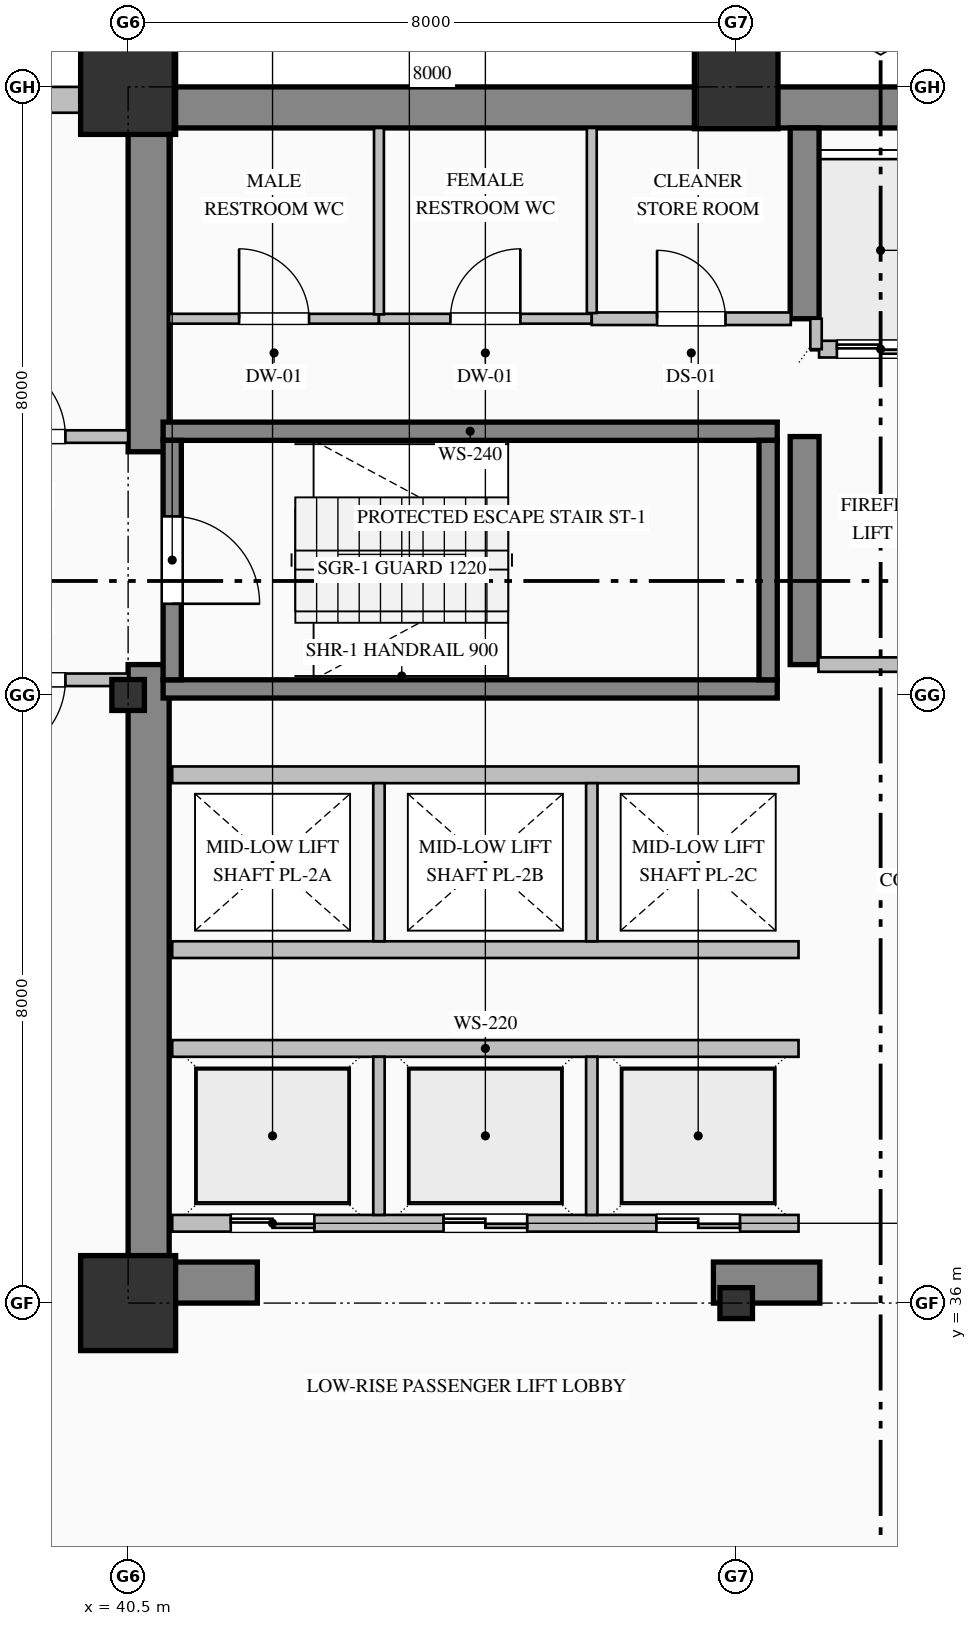
"""IFC4 building model, lengths in metres.
Left out: names, types, materials, properties, quantities, classifications, styles, units other than length and angle.
Written with IfcOpenShell. Run it as: python <this file> out.ifc"""

import sys

from ifc_helpers import new_model, si_unit, direction, frame, frame_2d, origin, origin_2d, place, context, subcontext, project, spatial, rectangle, hollow_rectangle, i_section, extrude, element, fill, save


model = new_model("IFC4")
c1 = context("Model", 3, precision=1e-05, world=origin(), true_north=direction((0.0, 1.0)))
c2 = subcontext(c1, "Body", "Model", "MODEL_VIEW")
j1 = project(units=[si_unit("LENGTHUNIT", "METRE"), si_unit("PLANEANGLEUNIT", "RADIAN")], contexts=[c1])
p1 = place(None, origin())
s1 = spatial("IfcSite", under=j1, at=p1, CompositionType="ELEMENT")
p2 = place(p1, origin())
s2 = spatial("IfcBuilding", under=s1, at=p2, CompositionType="ELEMENT")
p3 = place(p2, frame((0.0, 0.0, 56.2)))
s3 = spatial("IfcBuildingStorey", under=s2, at=p3, CompositionType="ELEMENT", Elevation=56.2)
p4 = place(p3, frame((40.5, 51.73, 0.0), z_axis=(0.0, 0.0, 1.0), x_axis=(1.0, 0.0, 0.0)))
e1 = element("IfcWall", 1, at=p4, inside=s3, PredefinedType="SHEAR", context=c2, shape_type="SweptSolid", body=[
    extrude(rectangle(XDim=23.5, YDim=0.54, at=frame_2d((11.75, 0.0))), origin(), (0.0, 0.0, 1.0), 3.75),
])
p5 = place(p3, frame((40.77, 36.54, 0.0), z_axis=(0.0, 0.0, 1.0), x_axis=(0.0, 1.0, 0.0)))
e2 = element("IfcWall", 2, at=p5, inside=s3, PredefinedType="SHEAR", context=c2, shape_type="SweptSolid", body=[
    extrude(rectangle(XDim=7.86, YDim=0.54, at=frame_2d((3.93, 0.0))), origin(), (0.0, 0.0, 1.0), 3.75),
])
p6 = place(p3, frame((40.77, 47.2, 0.0), z_axis=(0.0, 0.0, 1.0), x_axis=(0.0, 1.0, 0.0)))
e3 = element("IfcWall", 3, at=p6, inside=s3, PredefinedType="SHEAR", context=c2, shape_type="SweptSolid", body=[
    extrude(rectangle(XDim=4.26, YDim=0.54, at=frame_2d((2.13, 0.0))), origin(), (0.0, 0.0, 1.0), 3.75),
])
p7 = place(p3, frame((40.5, 36.27, 0.0), z_axis=(0.0, 0.0, 1.0), x_axis=(1.0, 0.0, 0.0)))
e4 = element("IfcWall", 4, at=p7, inside=s3, PredefinedType="SHEAR", context=c2, shape_type="SweptSolid", body=[
    extrude(rectangle(XDim=1.7, YDim=0.54, at=frame_2d((0.85, 0.0))), origin(), (0.0, 0.0, 1.0), 3.75),
])
p8 = place(p3, frame((48.2, 36.27, 0.0), z_axis=(0.0, 0.0, 1.0), x_axis=(1.0, 0.0, 0.0)))
e5 = element("IfcWall", 5, at=p8, inside=s3, PredefinedType="SHEAR", context=c2, shape_type="SweptSolid", body=[
    extrude(rectangle(XDim=1.4, YDim=0.54, at=frame_2d((0.7, 0.0))), origin(), (0.0, 0.0, 1.0), 3.75),
])
p9 = place(p3, frame((49.4, 44.4, 0.0), z_axis=(0.0, 0.0, 1.0), x_axis=(0.0, 1.0, 0.0)))
e6 = element("IfcWall", 6, at=p9, inside=s3, PredefinedType="SHEAR", context=c2, shape_type="SweptSolid", body=[
    extrude(rectangle(XDim=3.0, YDim=0.38, at=frame_2d((1.5, 0.0))), origin(), (0.0, 0.0, 1.0), 3.75),
])
p10 = place(p3, frame((49.4, 48.95, 0.0), z_axis=(0.0, 0.0, 1.0), x_axis=(0.0, 1.0, 0.0)))
e7 = element("IfcWall", 7, at=p10, inside=s3, PredefinedType="SHEAR", context=c2, shape_type="SweptSolid", body=[
    extrude(rectangle(XDim=2.51, YDim=0.38, at=frame_2d((1.255, 0.0))), origin(), (0.0, 0.0, 1.0), 3.75),
])
p11 = place(p3, frame((40.5, 36.0, 0.0), z_axis=(0.0, 0.0, 1.0), x_axis=(1.0, 0.0, 0.0)))
e8 = element("IfcColumn", 8, at=p11, inside=s3, PredefinedType="COLUMN", context=c2, shape_type="SweptSolid", body=[
    extrude(hollow_rectangle(XDim=1.25, YDim=1.25, WallThickness=0.045, at=origin_2d()), origin(), (0.0, 0.0, 1.0), 4.0),
])
p12 = place(p3, frame((40.5, 44.0, 0.0), z_axis=(0.0, 0.0, 1.0), x_axis=(1.0, 0.0, 0.0)))
e9 = element("IfcColumn", 9, at=p12, inside=s3, PredefinedType="COLUMN", context=c2, shape_type="SweptSolid", body=[
    extrude(i_section(OverallWidth=0.407, OverallDepth=0.428, WebThickness=0.02, FlangeThickness=0.035, FilletRadius=0.022, at=origin_2d()), origin(), (0.0, 0.0, 1.0), 4.0),
])
p13 = place(p3, frame((40.5, 52.0, 0.0), z_axis=(0.0, 0.0, 1.0), x_axis=(1.0, 0.0, 0.0)))
e10 = element("IfcColumn", 10, at=p13, inside=s3, PredefinedType="COLUMN", context=c2, shape_type="SweptSolid", body=[
    extrude(hollow_rectangle(XDim=1.25, YDim=1.25, WallThickness=0.045, at=origin_2d()), origin(), (0.0, 0.0, 1.0), 4.0),
])
p14 = place(p3, frame((48.5, 36.0, 0.0), z_axis=(0.0, 0.0, 1.0), x_axis=(1.0, 0.0, 0.0)))
e11 = element("IfcColumn", 11, at=p14, inside=s3, PredefinedType="COLUMN", context=c2, shape_type="SweptSolid", body=[
    extrude(i_section(OverallWidth=0.407, OverallDepth=0.428, WebThickness=0.02, FlangeThickness=0.035, FilletRadius=0.022, at=origin_2d()), origin(), (0.0, 0.0, 1.0), 4.0),
])
p15 = place(p3, frame((48.5, 52.0, 0.0), z_axis=(0.0, 0.0, 1.0), x_axis=(1.0, 0.0, 0.0)))
e12 = element("IfcColumn", 12, at=p15, inside=s3, PredefinedType="COLUMN", context=c2, shape_type="SweptSolid", body=[
    extrude(hollow_rectangle(XDim=1.1, YDim=1.1, WallThickness=0.04, at=origin_2d()), origin(), (0.0, 0.0, 1.0), 4.0),
])
p16 = place(p3, frame((4.0, 51.83, 0.0), z_axis=(0.0, 0.0, 1.0), x_axis=(1.0, 0.0, 0.0)))
e13 = element("IfcWall", 13, at=p16, inside=s3, PredefinedType="SOLIDWALL", context=c2, shape_type="SweptSolid", body=[
    extrude(rectangle(XDim=36.52, YDim=0.34, at=frame_2d((18.26, 0.0))), origin(), (0.0, 0.0, 1.0), 3.25),
])
p17 = place(p16, frame((6.15, 0.0, 0.85)))
e14 = element("IfcOpeningElement", 14, at=p17, cuts=e13, PredefinedType="OPENING", context=c2, shape_type="SweptSolid", body=[
    extrude(rectangle(XDim=2.1, YDim=2.05, at=frame_2d((1.05, 1.025))), frame((0.0, 0.18, 0.0), z_axis=(0.0, -1.0, 0.0), x_axis=(1.0, 0.0, 0.0)), (0.0, 0.0, 1.0), 0.36),
])
p18 = place(p16, frame((13.5, 0.0, 0.85)))
e15 = element("IfcOpeningElement", 15, at=p18, cuts=e13, PredefinedType="OPENING", context=c2, shape_type="SweptSolid", body=[
    extrude(rectangle(XDim=1.8, YDim=2.05, at=frame_2d((0.9, 1.025))), frame((0.0, 0.18, 0.0), z_axis=(0.0, -1.0, 0.0), x_axis=(1.0, 0.0, 0.0)), (0.0, 0.0, 1.0), 0.36),
])
p19 = place(p16, frame((16.95, 0.0, 0.85)))
e16 = element("IfcOpeningElement", 16, at=p19, cuts=e13, PredefinedType="OPENING", context=c2, shape_type="SweptSolid", body=[
    extrude(rectangle(XDim=2.1, YDim=2.05, at=frame_2d((1.05, 1.025))), frame((0.0, 0.18, 0.0), z_axis=(0.0, -1.0, 0.0), x_axis=(1.0, 0.0, 0.0)), (0.0, 0.0, 1.0), 0.36),
])
p20 = place(p16, frame((24.3, 0.0, 0.85)))
e17 = element("IfcOpeningElement", 17, at=p20, cuts=e13, PredefinedType="OPENING", context=c2, shape_type="SweptSolid", body=[
    extrude(rectangle(XDim=1.8, YDim=2.05, at=frame_2d((0.9, 1.025))), frame((0.0, 0.18, 0.0), z_axis=(0.0, -1.0, 0.0), x_axis=(1.0, 0.0, 0.0)), (0.0, 0.0, 1.0), 0.36),
])
for number, where, z_axis, x_axis in (
    (18, (40.96, 47.47, 0.0), (0.0, 0.0, 1.0), (1.0, 0.0, 0.0)),
    (19, (49.04, 44.08, 0.0), (0.0, 0.0, 1.0), (-1.0, 0.0, 0.0)),
):
    element("IfcWall", number, at=place(p3, frame(where, z_axis=z_axis, x_axis=x_axis)), inside=s3, PredefinedType="SOLIDWALL", context=c2, shape_type="SweptSolid", body=[
        extrude(rectangle(XDim=8.08, YDim=0.24, at=frame_2d((4.04, 0.0))), origin(), (0.0, 0.0, 1.0), 4.0),
    ])
p21 = place(p3, frame((41.08, 47.35, 0.0), z_axis=(0.0, 0.0, 1.0), x_axis=(0.0, -1.0, 0.0)))
e20 = element("IfcWall", 20, at=p21, inside=s3, PredefinedType="SOLIDWALL", context=c2, shape_type="SweptSolid", body=[
    extrude(rectangle(XDim=3.15, YDim=0.24, at=frame_2d((1.575, 0.0))), origin(), (0.0, 0.0, 1.0), 4.0),
])
p22 = place(p21, frame((1.0, 0.0, 0.0)))
e21 = element("IfcOpeningElement", 21, at=p22, cuts=e20, PredefinedType="OPENING", context=c2, shape_type="SweptSolid", body=[
    extrude(rectangle(XDim=1.15, YDim=2.2, at=frame_2d((0.575, 1.1))), frame((0.0, 0.13, 0.0), z_axis=(0.0, -1.0, 0.0), x_axis=(1.0, 0.0, 0.0)), (0.0, 0.0, 1.0), 0.26),
])
p23 = place(p3, frame((48.92, 44.2, 0.0), z_axis=(0.0, 0.0, 1.0), x_axis=(0.0, 1.0, 0.0)))
e22 = element("IfcWall", 22, at=p23, inside=s3, PredefinedType="SOLIDWALL", context=c2, shape_type="SweptSolid", body=[
    extrude(rectangle(XDim=3.15, YDim=0.24, at=frame_2d((1.575, 0.0))), origin(), (0.0, 0.0, 1.0), 4.0),
])
p24 = place(p3, frame((54.71, 48.55, 0.0), z_axis=(0.0, 0.0, 1.0), x_axis=(-1.0, 0.0, 0.0)))
e23 = element("IfcWall", 23, at=p24, inside=s3, PredefinedType="PARTITIONING", context=c2, shape_type="SweptSolid", body=[
    extrude(rectangle(XDim=5.12, YDim=0.22, at=frame_2d((2.56, 0.0))), origin(), (0.0, 0.0, 1.0), 3.75),
])
p25 = place(p24, frame((3.735, 0.0, 0.0)))
e24 = element("IfcOpeningElement", 24, at=p25, cuts=e23, PredefinedType="OPENING", context=c2, shape_type="SweptSolid", body=[
    extrude(rectangle(XDim=1.15, YDim=2.2, at=frame_2d((0.575, 1.1))), frame((0.0, 0.12, 0.0), z_axis=(0.0, -1.0, 0.0), x_axis=(1.0, 0.0, 0.0)), (0.0, 0.0, 1.0), 0.24),
])
p26 = place(p24, frame((0.935, 0.0, 0.0)))
e25 = element("IfcOpeningElement", 25, at=p26, cuts=e23, PredefinedType="OPENING", context=c2, shape_type="SweptSolid", body=[
    extrude(rectangle(XDim=1.15, YDim=2.2, at=frame_2d((0.575, 1.1))), frame((0.0, 0.12, 0.0), z_axis=(0.0, -1.0, 0.0), x_axis=(1.0, 0.0, 0.0)), (0.0, 0.0, 1.0), 0.24),
])
p27 = place(p3, frame((49.55, 48.55, 0.0), z_axis=(0.0, 0.0, 1.0), x_axis=(0.0, 1.0, 0.0)))
e26 = element("IfcWall", 26, at=p27, inside=s3, PredefinedType="PARTITIONING", context=c2, shape_type="SweptSolid", body=[
    extrude(rectangle(XDim=0.4, YDim=0.15, at=frame_2d((0.2, 0.0))), origin(), (0.0, 0.0, 1.0), 3.75),
])
p28 = place(p3, frame((49.32, 37.05, 0.0), z_axis=(0.0, 0.0, 1.0), x_axis=(-1.0, 0.0, 0.0)))
e27 = element("IfcWall", 27, at=p28, inside=s3, PredefinedType="PARTITIONING", context=c2, shape_type="SweptSolid", body=[
    extrude(rectangle(XDim=8.24, YDim=0.22, at=frame_2d((4.12, 0.0))), origin(), (0.0, 0.0, 1.0), 3.75),
])
p29 = place(p28, frame((6.37, 0.0, 0.0)))
e28 = element("IfcOpeningElement", 28, at=p29, cuts=e27, PredefinedType="OPENING", context=c2, shape_type="SweptSolid", body=[
    extrude(rectangle(XDim=1.1, YDim=2.2, at=frame_2d((0.55, 1.1))), frame((0.0, 0.12, 0.0), z_axis=(0.0, -1.0, 0.0), x_axis=(1.0, 0.0, 0.0)), (0.0, 0.0, 1.0), 0.24),
])
p30 = place(p28, frame((3.57, 0.0, 0.0)))
e29 = element("IfcOpeningElement", 29, at=p30, cuts=e27, PredefinedType="OPENING", context=c2, shape_type="SweptSolid", body=[
    extrude(rectangle(XDim=1.1, YDim=2.2, at=frame_2d((0.55, 1.1))), frame((0.0, 0.12, 0.0), z_axis=(0.0, -1.0, 0.0), x_axis=(1.0, 0.0, 0.0)), (0.0, 0.0, 1.0), 0.24),
])
p31 = place(p28, frame((0.77, 0.0, 0.0)))
e30 = element("IfcOpeningElement", 30, at=p31, cuts=e27, PredefinedType="OPENING", context=c2, shape_type="SweptSolid", body=[
    extrude(rectangle(XDim=1.1, YDim=2.2, at=frame_2d((0.55, 1.1))), frame((0.0, 0.12, 0.0), z_axis=(0.0, -1.0, 0.0), x_axis=(1.0, 0.0, 0.0)), (0.0, 0.0, 1.0), 0.24),
])
p32 = place(p3, frame((41.08, 39.35, 0.0), z_axis=(0.0, 0.0, 1.0), x_axis=(1.0, 0.0, 0.0)))
e31 = element("IfcWall", 31, at=p32, inside=s3, PredefinedType="PARTITIONING", context=c2, shape_type="SweptSolid", body=[
    extrude(rectangle(XDim=8.24, YDim=0.22, at=frame_2d((4.12, 0.0))), origin(), (0.0, 0.0, 1.0), 3.75),
])
for number, where, z_axis, x_axis in (
    (32, (43.8, 37.16, 0.0), (0.0, 0.0, 1.0), (0.0, 1.0, 0.0)),
    (33, (46.6, 37.16, 0.0), (0.0, 0.0, 1.0), (0.0, 1.0, 0.0)),
):
    element("IfcWall", number, at=place(p3, frame(where, z_axis=z_axis, x_axis=x_axis)), inside=s3, PredefinedType="PARTITIONING", context=c2, shape_type="SweptSolid", body=[
        extrude(rectangle(XDim=2.08, YDim=0.15, at=frame_2d((1.04, 0.0))), origin(), (0.0, 0.0, 1.0), 3.75),
    ])
for number, where, z_axis, x_axis in (
    (34, (49.32, 40.65, 0.0), (0.0, 0.0, 1.0), (-1.0, 0.0, 0.0)),
    (35, (41.08, 42.95, 0.0), (0.0, 0.0, 1.0), (1.0, 0.0, 0.0)),
):
    element("IfcWall", number, at=place(p3, frame(where, z_axis=z_axis, x_axis=x_axis)), inside=s3, PredefinedType="PARTITIONING", context=c2, shape_type="SweptSolid", body=[
        extrude(rectangle(XDim=8.24, YDim=0.22, at=frame_2d((4.12, 0.0))), origin(), (0.0, 0.0, 1.0), 3.75),
    ])
for number, where, z_axis, x_axis in (
    (36, (43.8, 40.76, 0.0), (0.0, 0.0, 1.0), (0.0, 1.0, 0.0)),
    (37, (46.6, 40.76, 0.0), (0.0, 0.0, 1.0), (0.0, 1.0, 0.0)),
):
    element("IfcWall", number, at=place(p3, frame(where, z_axis=z_axis, x_axis=x_axis)), inside=s3, PredefinedType="PARTITIONING", context=c2, shape_type="SweptSolid", body=[
        extrude(rectangle(XDim=2.08, YDim=0.15, at=frame_2d((1.04, 0.0))), origin(), (0.0, 0.0, 1.0), 3.75),
    ])
p33 = place(p3, frame((37.8, 47.4, 0.0), z_axis=(0.0, 0.0, 1.0), x_axis=(1.0, 0.0, 0.0)))
e38 = element("IfcWall", 38, at=p33, inside=s3, PredefinedType="PARTITIONING", context=c2, shape_type="SweptSolid", body=[
    extrude(rectangle(XDim=2.7, YDim=0.165, at=frame_2d((1.35, 0.0))), origin(), (0.0, 0.0, 1.0), 3.75),
])
p34 = place(p33, frame((0.825, 0.0, 0.0)))
e39 = element("IfcOpeningElement", 39, at=p34, cuts=e38, PredefinedType="OPENING", context=c2, shape_type="SweptSolid", body=[
    extrude(rectangle(XDim=1.05, YDim=2.15, at=frame_2d((0.525, 1.075))), frame((0.0, 0.093, 0.0), z_axis=(0.0, -1.0, 0.0), x_axis=(1.0, 0.0, 0.0)), (0.0, 0.0, 1.0), 0.185),
])
p35 = place(p3, frame((40.5, 44.2, 0.0), z_axis=(0.0, 0.0, 1.0), x_axis=(-1.0, 0.0, 0.0)))
e40 = element("IfcWall", 40, at=p35, inside=s3, PredefinedType="PARTITIONING", context=c2, shape_type="SweptSolid", body=[
    extrude(rectangle(XDim=2.7, YDim=0.165, at=frame_2d((1.35, 0.0))), origin(), (0.0, 0.0, 1.0), 3.75),
])
p36 = place(p35, frame((0.825, 0.0, 0.0)))
e41 = element("IfcOpeningElement", 41, at=p36, cuts=e40, PredefinedType="OPENING", context=c2, shape_type="SweptSolid", body=[
    extrude(rectangle(XDim=1.05, YDim=2.15, at=frame_2d((0.525, 1.075))), frame((0.0, 0.093, 0.0), z_axis=(0.0, -1.0, 0.0), x_axis=(1.0, 0.0, 0.0)), (0.0, 0.0, 1.0), 0.185),
])
p37 = place(p3, frame((41.04, 48.95, 0.0), z_axis=(0.0, 0.0, 1.0), x_axis=(1.0, 0.0, 0.0)))
e42 = element("IfcWall", 42, at=p37, inside=s3, PredefinedType="PARTITIONING", context=c2, shape_type="SweptSolid", body=[
    extrude(rectangle(XDim=2.76, YDim=0.13, at=frame_2d((1.38, 0.0))), origin(), (0.0, 0.0, 1.0), 3.75),
])
p38 = place(p37, frame((0.92, 0.0, 0.0)))
e43 = element("IfcOpeningElement", 43, at=p38, cuts=e42, PredefinedType="OPENING", context=c2, shape_type="SweptSolid", body=[
    extrude(rectangle(XDim=0.92, YDim=2.15, at=frame_2d((0.46, 1.075))), frame((0.0, 0.075, 0.0), z_axis=(0.0, -1.0, 0.0), x_axis=(1.0, 0.0, 0.0)), (0.0, 0.0, 1.0), 0.15),
])
p39 = place(p3, frame((43.8, 48.95, 0.0), z_axis=(0.0, 0.0, 1.0), x_axis=(1.0, 0.0, 0.0)))
e44 = element("IfcWall", 44, at=p39, inside=s3, PredefinedType="PARTITIONING", context=c2, shape_type="SweptSolid", body=[
    extrude(rectangle(XDim=2.8, YDim=0.13, at=frame_2d((1.4, 0.0))), origin(), (0.0, 0.0, 1.0), 3.75),
])
p40 = place(p39, frame((0.94, 0.0, 0.0)))
e45 = element("IfcOpeningElement", 45, at=p40, cuts=e44, PredefinedType="OPENING", context=c2, shape_type="SweptSolid", body=[
    extrude(rectangle(XDim=0.92, YDim=2.15, at=frame_2d((0.46, 1.075))), frame((0.0, 0.075, 0.0), z_axis=(0.0, -1.0, 0.0), x_axis=(1.0, 0.0, 0.0)), (0.0, 0.0, 1.0), 0.15),
])
p41 = place(p3, frame((46.6, 48.95, 0.0), z_axis=(0.0, 0.0, 1.0), x_axis=(1.0, 0.0, 0.0)))
e46 = element("IfcWall", 46, at=p41, inside=s3, PredefinedType="PARTITIONING", context=c2, shape_type="SweptSolid", body=[
    extrude(rectangle(XDim=2.618, YDim=0.165, at=frame_2d((1.309, 0.0))), origin(), (0.0, 0.0, 1.0), 3.75),
])
p42 = place(p41, frame((0.859, 0.0, 0.0)))
e47 = element("IfcOpeningElement", 47, at=p42, cuts=e46, PredefinedType="OPENING", context=c2, shape_type="SweptSolid", body=[
    extrude(rectangle(XDim=0.9, YDim=2.15, at=frame_2d((0.45, 1.075))), frame((0.0, 0.093, 0.0), z_axis=(0.0, -1.0, 0.0), x_axis=(1.0, 0.0, 0.0)), (0.0, 0.0, 1.0), 0.185),
])
p43 = place(p3, frame((54.718, 44.4, 0.0), z_axis=(0.0, 0.0, 1.0), x_axis=(-1.0, 0.0, 0.0)))
e48 = element("IfcWall", 48, at=p43, inside=s3, PredefinedType="PARTITIONING", context=c2, shape_type="SweptSolid", body=[
    extrude(rectangle(XDim=5.136, YDim=0.19, at=frame_2d((2.568, 0.0))), origin(), (0.0, 0.0, 1.0), 3.75),
])
p44 = place(p43, frame((2.043, 0.0, 0.0)))
e49 = element("IfcOpeningElement", 49, at=p44, cuts=e48, PredefinedType="OPENING", context=c2, shape_type="SweptSolid", body=[
    extrude(rectangle(XDim=1.05, YDim=2.15, at=frame_2d((0.525, 1.075))), frame((0.0, 0.105, 0.0), z_axis=(0.0, -1.0, 0.0), x_axis=(1.0, 0.0, 0.0)), (0.0, 0.0, 1.0), 0.21),
])
p45 = place(p3, frame((43.8, 51.46, 0.0), z_axis=(0.0, 0.0, 1.0), x_axis=(0.0, -1.0, 0.0)))
e50 = element("IfcWall", 50, at=p45, inside=s3, PredefinedType="PARTITIONING", context=c2, shape_type="SweptSolid", body=[
    extrude(rectangle(XDim=2.453, YDim=0.13, at=frame_2d((1.227, 0.0))), origin(), (0.0, 0.0, 1.0), 3.75),
])
p46 = place(p3, frame((46.6, 51.46, 0.0), z_axis=(0.0, 0.0, 1.0), x_axis=(0.0, -1.0, 0.0)))
e51 = element("IfcWall", 51, at=p46, inside=s3, PredefinedType="PARTITIONING", context=c2, shape_type="SweptSolid", body=[
    extrude(rectangle(XDim=2.436, YDim=0.13, at=frame_2d((1.218, 0.0))), origin(), (0.0, 0.0, 1.0), 3.75),
])
p47 = place(p22, origin())
e52 = element("IfcDoor", 52, at=p47, inside=s3, OperationType="SINGLE_SWING_RIGHT", PredefinedType="DOOR", context=c2, shape_type="SweptSolid", body=[
    extrude(rectangle(XDim=1.15, YDim=2.2, at=frame_2d((0.575, 1.1))), frame((0.0, 0.025, 0.0), z_axis=(0.0, -1.0, 0.0), x_axis=(1.0, 0.0, 0.0)), (0.0, 0.0, 1.0), 0.05),
])
fill(e21, e52)
p48 = place(p25, origin())
e53 = element("IfcDoor", 53, at=p48, inside=s3, OperationType="DOUBLE_DOOR_SLIDING", PredefinedType="DOOR", context=c2, shape_type="SweptSolid", body=[
    extrude(rectangle(XDim=1.15, YDim=2.2, at=frame_2d((0.575, 1.1))), frame((0.0, 0.025, 0.0), z_axis=(0.0, -1.0, 0.0), x_axis=(1.0, 0.0, 0.0)), (0.0, 0.0, 1.0), 0.05),
])
fill(e24, e53)
p49 = place(p29, origin())
e54 = element("IfcDoor", 54, at=p49, inside=s3, OperationType="DOUBLE_DOOR_SLIDING", PredefinedType="DOOR", context=c2, shape_type="SweptSolid", body=[
    extrude(rectangle(XDim=1.1, YDim=2.2, at=frame_2d((0.55, 1.1))), frame((0.0, 0.025, 0.0), z_axis=(0.0, -1.0, 0.0), x_axis=(1.0, 0.0, 0.0)), (0.0, 0.0, 1.0), 0.05),
])
fill(e28, e54)
p50 = place(p30, origin())
e55 = element("IfcDoor", 55, at=p50, inside=s3, OperationType="DOUBLE_DOOR_SLIDING", PredefinedType="DOOR", context=c2, shape_type="SweptSolid", body=[
    extrude(rectangle(XDim=1.1, YDim=2.2, at=frame_2d((0.55, 1.1))), frame((0.0, 0.025, 0.0), z_axis=(0.0, -1.0, 0.0), x_axis=(1.0, 0.0, 0.0)), (0.0, 0.0, 1.0), 0.05),
])
fill(e29, e55)
p51 = place(p31, origin())
e56 = element("IfcDoor", 56, at=p51, inside=s3, OperationType="DOUBLE_DOOR_SLIDING", PredefinedType="DOOR", context=c2, shape_type="SweptSolid", body=[
    extrude(rectangle(XDim=1.1, YDim=2.2, at=frame_2d((0.55, 1.1))), frame((0.0, 0.025, 0.0), z_axis=(0.0, -1.0, 0.0), x_axis=(1.0, 0.0, 0.0)), (0.0, 0.0, 1.0), 0.05),
])
fill(e30, e56)
p52 = place(p34, origin())
e57 = element("IfcDoor", 57, at=p52, inside=s3, OperationType="SINGLE_SWING_LEFT", PredefinedType="DOOR", context=c2, shape_type="SweptSolid", body=[
    extrude(rectangle(XDim=1.05, YDim=2.15, at=frame_2d((0.525, 1.075))), frame((0.0, 0.025, 0.0), z_axis=(0.0, -1.0, 0.0), x_axis=(1.0, 0.0, 0.0)), (0.0, 0.0, 1.0), 0.05),
])
fill(e39, e57)
p53 = place(p36, origin())
e58 = element("IfcDoor", 58, at=p53, inside=s3, OperationType="SINGLE_SWING_RIGHT", PredefinedType="DOOR", context=c2, shape_type="SweptSolid", body=[
    extrude(rectangle(XDim=1.05, YDim=2.15, at=frame_2d((0.525, 1.075))), frame((0.0, 0.025, 0.0), z_axis=(0.0, -1.0, 0.0), x_axis=(1.0, 0.0, 0.0)), (0.0, 0.0, 1.0), 0.05),
])
fill(e41, e58)
p54 = place(p38, origin())
e59 = element("IfcDoor", 59, at=p54, inside=s3, OperationType="SINGLE_SWING_LEFT", PredefinedType="DOOR", context=c2, shape_type="SweptSolid", body=[
    extrude(rectangle(XDim=0.92, YDim=2.15, at=frame_2d((0.46, 1.075))), frame((0.0, 0.025, 0.0), z_axis=(0.0, -1.0, 0.0), x_axis=(1.0, 0.0, 0.0)), (0.0, 0.0, 1.0), 0.05),
])
fill(e43, e59)
p55 = place(p40, origin())
e60 = element("IfcDoor", 60, at=p55, inside=s3, OperationType="SINGLE_SWING_RIGHT", PredefinedType="DOOR", context=c2, shape_type="SweptSolid", body=[
    extrude(rectangle(XDim=0.92, YDim=2.15, at=frame_2d((0.46, 1.075))), frame((0.0, 0.025, 0.0), z_axis=(0.0, -1.0, 0.0), x_axis=(1.0, 0.0, 0.0)), (0.0, 0.0, 1.0), 0.05),
])
fill(e45, e60)
p56 = place(p42, origin())
e61 = element("IfcDoor", 61, at=p56, inside=s3, OperationType="SINGLE_SWING_LEFT", PredefinedType="DOOR", context=c2, shape_type="SweptSolid", body=[
    extrude(rectangle(XDim=0.9, YDim=2.15, at=frame_2d((0.45, 1.075))), frame((0.0, 0.025, 0.0), z_axis=(0.0, -1.0, 0.0), x_axis=(1.0, 0.0, 0.0)), (0.0, 0.0, 1.0), 0.05),
])
fill(e47, e61)
save(model, sys.argv[1])
